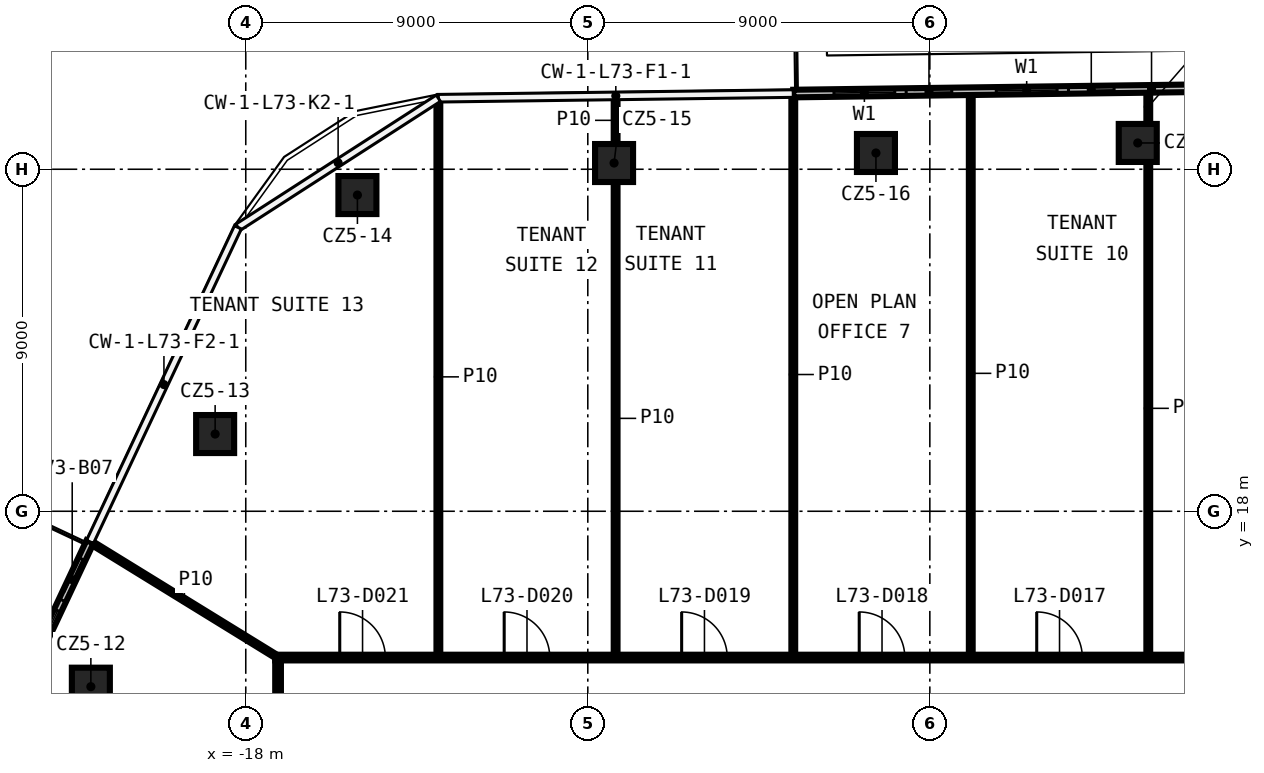
"""IFC4 building model, lengths in metres.
Left out: names, types, materials, properties, quantities, classifications, styles, units other than length and angle.
Written with IfcOpenShell. Run it as: python <this file> out.ifc"""

import sys

from ifc_helpers import new_model, si_unit, direction, frame, frame_2d, origin, origin_2d, place, context, subcontext, project, spatial, rectangle, extrude, element, fill, save


model = new_model("IFC4")
c1 = context("Model", 3, precision=1e-05, world=origin(), true_north=direction((0.0, 1.0)))
c2 = subcontext(c1, "Body", "Model", "MODEL_VIEW")
j1 = project(units=[si_unit("LENGTHUNIT", "METRE"), si_unit("PLANEANGLEUNIT", "RADIAN")], contexts=[c1])
p1 = place(None, origin())
s1 = spatial("IfcSite", under=j1, at=p1, CompositionType="ELEMENT")
p2 = place(p1, origin())
s2 = spatial("IfcBuilding", under=s1, at=p2, CompositionType="ELEMENT")
p3 = place(p2, frame((0.0, 0.0, 340.4)))
s3 = spatial("IfcBuildingStorey", under=s2, at=p3, CompositionType="ELEMENT", Elevation=340.4)
for number, where, z_axis, x_axis in (
    (1, (-22.076, 13.384, 0.0), (0.0, 0.0, 1.0), (1.0, 0.0, 0.0)),
    (2, (-18.806, 20.032, 0.0), (0.0, 0.0, 1.0), (1.0, 0.0, 0.0)),
    (3, (-15.062, 26.321, 0.0), (0.0, 0.0, 1.0), (1.0, 0.0, 0.0)),
    (4, (-8.309, 27.164, 0.0), (0.0, 0.0, 1.0), (1.0, 0.0, 0.0)),
    (5, (-1.418, 27.428, 0.0), (0.0, 0.0, 1.0), (1.0, 0.0, 0.0)),
    (6, (5.471, 27.692, 0.0), (0.0, 0.0, 1.0), (1.0, 0.0, 0.0)),
):
    element("IfcColumn", number, at=place(p3, frame(where, z_axis=z_axis, x_axis=x_axis)), inside=s3, PredefinedType="COLUMN", context=c2, shape_type="SweptSolid", body=[
        extrude(rectangle(XDim=1.0, YDim=1.0, at=origin_2d()), origin(), (0.0, 0.0, 1.0), 3.82),
    ])
p4 = place(p3, frame((-17.225, 14.15, 0.0), z_axis=(0.0, 0.0, 1.0), x_axis=(1.0, 0.0, 0.0)))
e7 = element("IfcWall", 7, at=p4, inside=s3, PredefinedType="PARTITIONING", context=c2, shape_type="SweptSolid", body=[
    extrude(rectangle(XDim=34.45, YDim=0.15, at=frame_2d((17.225, 0.0))), origin(), (0.0, 0.0, 1.0), 3.82),
])
p5 = place(p4, frame((24.708, 0.0, 0.0)))
e8 = element("IfcOpeningElement", 8, at=p5, cuts=e7, PredefinedType="OPENING", context=c2, shape_type="SweptSolid", body=[
    extrude(rectangle(XDim=1.2, YDim=2.1, at=frame_2d((0.6, 1.05))), frame((0.0, 0.085, 0.0), z_axis=(0.0, -1.0, 0.0), x_axis=(1.0, 0.0, 0.0)), (0.0, 0.0, 1.0), 0.17),
])
p6 = place(p4, frame((20.038, 0.0, 0.0)))
e9 = element("IfcOpeningElement", 9, at=p6, cuts=e7, PredefinedType="OPENING", context=c2, shape_type="SweptSolid", body=[
    extrude(rectangle(XDim=1.2, YDim=2.1, at=frame_2d((0.6, 1.05))), frame((0.0, 0.085, 0.0), z_axis=(0.0, -1.0, 0.0), x_axis=(1.0, 0.0, 0.0)), (0.0, 0.0, 1.0), 0.17),
])
p7 = place(p4, frame((15.367, 0.0, 0.0)))
e10 = element("IfcOpeningElement", 10, at=p7, cuts=e7, PredefinedType="OPENING", context=c2, shape_type="SweptSolid", body=[
    extrude(rectangle(XDim=1.2, YDim=2.1, at=frame_2d((0.6, 1.05))), frame((0.0, 0.085, 0.0), z_axis=(0.0, -1.0, 0.0), x_axis=(1.0, 0.0, 0.0)), (0.0, 0.0, 1.0), 0.17),
])
p8 = place(p4, frame((10.695, 0.0, 0.0)))
e11 = element("IfcOpeningElement", 11, at=p8, cuts=e7, PredefinedType="OPENING", context=c2, shape_type="SweptSolid", body=[
    extrude(rectangle(XDim=1.2, YDim=2.1, at=frame_2d((0.6, 1.05))), frame((0.0, 0.085, 0.0), z_axis=(0.0, -1.0, 0.0), x_axis=(1.0, 0.0, 0.0)), (0.0, 0.0, 1.0), 0.17),
])
p9 = place(p4, frame((6.025, 0.0, 0.0)))
e12 = element("IfcOpeningElement", 12, at=p9, cuts=e7, PredefinedType="OPENING", context=c2, shape_type="SweptSolid", body=[
    extrude(rectangle(XDim=1.2, YDim=2.1, at=frame_2d((0.6, 1.05))), frame((0.0, 0.085, 0.0), z_axis=(0.0, -1.0, 0.0), x_axis=(1.0, 0.0, 0.0)), (0.0, 0.0, 1.0), 0.17),
])
p10 = place(p4, frame((1.698, 0.0, 0.0)))
e13 = element("IfcOpeningElement", 13, at=p10, cuts=e7, PredefinedType="OPENING", context=c2, shape_type="SweptSolid", body=[
    extrude(rectangle(XDim=1.2, YDim=2.1, at=frame_2d((0.6, 1.05))), frame((0.0, 0.085, 0.0), z_axis=(0.0, -1.0, 0.0), x_axis=(1.0, 0.0, 0.0)), (0.0, 0.0, 1.0), 0.17),
])
p11 = place(p3, frame((5.748, 14.225, 0.0), z_axis=(0.0, 0.0, 1.0), x_axis=(0.0, 1.0, 0.0)))
e14 = element("IfcWall", 14, at=p11, inside=s3, PredefinedType="PARTITIONING", context=c2, shape_type="SweptSolid", body=[
    extrude(rectangle(XDim=12.967, YDim=0.1, at=frame_2d((6.483, 0.0))), origin(), (0.0, 0.0, 1.0), 3.82),
])
p12 = place(p3, frame((5.748, 28.192, 0.0), z_axis=(0.0, 0.0, 1.0), x_axis=(0.0, 1.0, 0.0)))
e15 = element("IfcWall", 15, at=p12, inside=s3, PredefinedType="PARTITIONING", context=c2, shape_type="SweptSolid", body=[
    extrude(rectangle(XDim=0.903, YDim=0.1, at=frame_2d((0.452, 0.0))), origin(), (0.0, 0.0, 1.0), 3.82),
])
p13 = place(p3, frame((1.077, 14.225, 0.0), z_axis=(0.0, 0.0, 1.0), x_axis=(0.0, 1.0, 0.0)))
e16 = element("IfcWall", 16, at=p13, inside=s3, PredefinedType="PARTITIONING", context=c2, shape_type="SweptSolid", body=[
    extrude(rectangle(XDim=14.808, YDim=0.1, at=frame_2d((7.404, 0.0))), origin(), (0.0, 0.0, 1.0), 3.82),
])
p14 = place(p3, frame((-3.593, 14.225, 0.0), z_axis=(0.0, 0.0, 1.0), x_axis=(0.0, 1.0, 0.0)))
e17 = element("IfcWall", 17, at=p14, inside=s3, PredefinedType="PARTITIONING", context=c2, shape_type="SweptSolid", body=[
    extrude(rectangle(XDim=14.747, YDim=0.1, at=frame_2d((7.374, 0.0))), origin(), (0.0, 0.0, 1.0), 3.82),
])
p15 = place(p3, frame((-8.268, 14.225, 0.0), z_axis=(0.0, 0.0, 1.0), x_axis=(0.0, 1.0, 0.0)))
e18 = element("IfcWall", 18, at=p15, inside=s3, PredefinedType="PARTITIONING", context=c2, shape_type="SweptSolid", body=[
    extrude(rectangle(XDim=12.439, YDim=0.1, at=frame_2d((6.219, 0.0))), origin(), (0.0, 0.0, 1.0), 3.82),
])
p16 = place(p3, frame((-8.268, 27.664, 0.0), z_axis=(0.0, 0.0, 1.0), x_axis=(0.0, 1.0, 0.0)))
e19 = element("IfcWall", 19, at=p16, inside=s3, PredefinedType="PARTITIONING", context=c2, shape_type="SweptSolid", body=[
    extrude(rectangle(XDim=1.246, YDim=0.1, at=frame_2d((0.623, 0.0))), origin(), (0.0, 0.0, 1.0), 3.82),
])
p17 = place(p3, frame((-12.932, 14.225, 0.0), z_axis=(0.0, 0.0, 1.0), x_axis=(0.0, 1.0, 0.0)))
e20 = element("IfcWall", 20, at=p17, inside=s3, PredefinedType="PARTITIONING", context=c2, shape_type="SweptSolid", body=[
    extrude(rectangle(XDim=14.624, YDim=0.1, at=frame_2d((7.312, 0.0))), origin(), (0.0, 0.0, 1.0), 3.82),
])
p18 = place(p3, frame((-17.15, -14.075, 0.0), z_axis=(0.0, 0.0, 1.0), x_axis=(0.0, 1.0, 0.0)))
e21 = element("IfcWall", 21, at=p18, inside=s3, PredefinedType="PARTITIONING", context=c2, shape_type="SweptSolid", body=[
    extrude(rectangle(XDim=28.15, YDim=0.15, at=frame_2d((14.075, 0.0))), origin(), (0.0, 0.0, 1.0), 3.82),
])
p19 = place(p18, frame((11.122, 0.0, 0.0)))
e22 = element("IfcOpeningElement", 22, at=p19, cuts=e21, PredefinedType="OPENING", context=c2, shape_type="SweptSolid", body=[
    extrude(rectangle(XDim=1.2, YDim=2.1, at=frame_2d((0.6, 1.05))), frame((0.0, 0.085, 0.0), z_axis=(0.0, -1.0, 0.0), x_axis=(1.0, 0.0, 0.0)), (0.0, 0.0, 1.0), 0.17),
])
p20 = place(p18, frame((5.555, 0.0, 0.0)))
e23 = element("IfcOpeningElement", 23, at=p20, cuts=e21, PredefinedType="OPENING", context=c2, shape_type="SweptSolid", body=[
    extrude(rectangle(XDim=1.2, YDim=2.1, at=frame_2d((0.6, 1.05))), frame((0.0, 0.085, 0.0), z_axis=(0.0, -1.0, 0.0), x_axis=(1.0, 0.0, 0.0)), (0.0, 0.0, 1.0), 0.17),
])
p21 = place(p18, frame((1.7, 0.0, 0.0)))
e24 = element("IfcOpeningElement", 24, at=p21, cuts=e21, PredefinedType="OPENING", context=c2, shape_type="SweptSolid", body=[
    extrude(rectangle(XDim=1.2, YDim=2.1, at=frame_2d((0.6, 1.05))), frame((0.0, 0.085, 0.0), z_axis=(0.0, -1.0, 0.0), x_axis=(1.0, 0.0, 0.0)), (0.0, 0.0, 1.0), 0.17),
])
p22 = place(p18, frame((24.457, 0.0, 0.0)))
e25 = element("IfcOpeningElement", 25, at=p22, cuts=e21, PredefinedType="OPENING", context=c2, shape_type="SweptSolid", body=[
    extrude(rectangle(XDim=1.2, YDim=2.1, at=frame_2d((0.6, 1.05))), frame((0.0, 0.085, 0.0), z_axis=(0.0, -1.0, 0.0), x_axis=(1.0, 0.0, 0.0)), (0.0, 0.0, 1.0), 0.17),
])
p23 = place(p18, frame((20.314, 0.0, 0.0)))
e26 = element("IfcOpeningElement", 26, at=p23, cuts=e21, PredefinedType="OPENING", context=c2, shape_type="SweptSolid", body=[
    extrude(rectangle(XDim=1.2, YDim=2.1, at=frame_2d((0.6, 1.05))), frame((0.0, 0.085, 0.0), z_axis=(0.0, -1.0, 0.0), x_axis=(1.0, 0.0, 0.0)), (0.0, 0.0, 1.0), 0.17),
])
p24 = place(p18, frame((16.172, 0.0, 0.0)))
e27 = element("IfcOpeningElement", 27, at=p24, cuts=e21, PredefinedType="OPENING", context=c2, shape_type="SweptSolid", body=[
    extrude(rectangle(XDim=1.2, YDim=2.1, at=frame_2d((0.6, 1.05))), frame((0.0, 0.085, 0.0), z_axis=(0.0, -1.0, 0.0), x_axis=(1.0, 0.0, 0.0)), (0.0, 0.0, 1.0), 0.17),
])
p25 = place(p3, frame((-22.081, 17.185, 0.0), z_axis=(0.0, 0.0, 1.0), x_axis=(0.85162357217, -0.524153881341, 0.0)))
e28 = element("IfcWall", 28, at=p25, inside=s3, PredefinedType="PARTITIONING", context=c2, shape_type="SweptSolid", body=[
    extrude(rectangle(XDim=5.791, YDim=0.1, at=frame_2d((2.895, 0.0))), origin(), (0.0, 0.0, 1.0), 3.82),
])
p26 = place(p3, frame((10.419, 29.177, 0.0), z_axis=(0.0, 0.0, 1.0), x_axis=(-0.999913262087, -0.013170736582, 0.0)))
e29 = element("IfcWall", 29, at=p26, inside=s3, PredefinedType="SOLIDWALL", context=c2, shape_type="SweptSolid", body=[
    extrude(rectangle(XDim=14.014, YDim=0.2, at=frame_2d((7.007, 0.0))), origin(), (0.0, 0.0, 1.0), 3.82),
])
p27 = place(p26, frame((2.0, 0.0, 0.6)))
e30 = element("IfcOpeningElement", 30, at=p27, cuts=e29, PredefinedType="OPENING", context=c2, shape_type="SweptSolid", body=[
    extrude(rectangle(XDim=1.6, YDim=2.4, at=frame_2d((0.8, 1.2))), frame((0.0, 0.11, 0.0), z_axis=(0.0, -1.0, 0.0), x_axis=(1.0, 0.0, 0.0)), (0.0, 0.0, 1.0), 0.22),
])
p28 = place(p26, frame((0.5, 0.0, 0.0)))
e31 = element("IfcOpeningElement", 31, at=p28, cuts=e29, PredefinedType="OPENING", context=c2, shape_type="SweptSolid", body=[
    extrude(rectangle(XDim=1.2, YDim=2.4, at=frame_2d((0.6, 1.2))), frame((0.0, 0.11, 0.0), z_axis=(0.0, -1.0, 0.0), x_axis=(1.0, 0.0, 0.0)), (0.0, 0.0, 1.0), 0.22),
])
p29 = place(p26, frame((7.071, 0.0, 0.6)))
e32 = element("IfcOpeningElement", 32, at=p29, cuts=e29, PredefinedType="OPENING", context=c2, shape_type="SweptSolid", body=[
    extrude(rectangle(XDim=1.6, YDim=2.4, at=frame_2d((0.8, 1.2))), frame((0.0, 0.11, 0.0), z_axis=(0.0, -1.0, 0.0), x_axis=(1.0, 0.0, 0.0)), (0.0, 0.0, 1.0), 0.22),
])
p30 = place(p26, frame((5.571, 0.0, 0.0)))
e33 = element("IfcOpeningElement", 33, at=p30, cuts=e29, PredefinedType="OPENING", context=c2, shape_type="SweptSolid", body=[
    extrude(rectangle(XDim=1.2, YDim=2.4, at=frame_2d((0.6, 1.2))), frame((0.0, 0.11, 0.0), z_axis=(0.0, -1.0, 0.0), x_axis=(1.0, 0.0, 0.0)), (0.0, 0.0, 1.0), 0.22),
])
p31 = place(p26, frame((11.342, 0.0, 0.6)))
e34 = element("IfcOpeningElement", 34, at=p31, cuts=e29, PredefinedType="OPENING", context=c2, shape_type="SweptSolid", body=[
    extrude(rectangle(XDim=1.6, YDim=2.4, at=frame_2d((0.8, 1.2))), frame((0.0, 0.11, 0.0), z_axis=(0.0, -1.0, 0.0), x_axis=(1.0, 0.0, 0.0)), (0.0, 0.0, 1.0), 0.22),
])
p32 = place(p26, frame((9.842, 0.0, 0.0)))
e35 = element("IfcOpeningElement", 35, at=p32, cuts=e29, PredefinedType="OPENING", context=c2, shape_type="SweptSolid", body=[
    extrude(rectangle(XDim=1.2, YDim=2.4, at=frame_2d((0.6, 1.2))), frame((0.0, 0.11, 0.0), z_axis=(0.0, -1.0, 0.0), x_axis=(1.0, 0.0, 0.0)), (0.0, 0.0, 1.0), 0.22),
])
p33 = place(p3, frame((-22.099, 17.195, 0.0), z_axis=(0.0, 0.0, 1.0), x_axis=(-0.425492631057, -0.904961889206, 0.0)))
e36 = element("IfcWall", 36, at=p33, inside=s3, PredefinedType="SOLIDWALL", context=c2, shape_type="SweptSolid", body=[
    extrude(rectangle(XDim=18.309, YDim=0.2, at=frame_2d((9.155, 0.0))), origin(), (0.0, 0.0, 1.0), 3.82),
])
p34 = place(p33, frame((2.0, 0.0, 0.6)))
e37 = element("IfcOpeningElement", 37, at=p34, cuts=e36, PredefinedType="OPENING", context=c2, shape_type="SweptSolid", body=[
    extrude(rectangle(XDim=1.6, YDim=2.4, at=frame_2d((0.8, 1.2))), frame((0.0, 0.11, 0.0), z_axis=(0.0, -1.0, 0.0), x_axis=(1.0, 0.0, 0.0)), (0.0, 0.0, 1.0), 0.22),
])
p35 = place(p33, frame((0.5, 0.0, 0.0)))
e38 = element("IfcOpeningElement", 38, at=p35, cuts=e36, PredefinedType="OPENING", context=c2, shape_type="SweptSolid", body=[
    extrude(rectangle(XDim=1.2, YDim=2.4, at=frame_2d((0.6, 1.2))), frame((0.0, 0.11, 0.0), z_axis=(0.0, -1.0, 0.0), x_axis=(1.0, 0.0, 0.0)), (0.0, 0.0, 1.0), 0.22),
])
p36 = place(p33, frame((6.577, 0.0, 0.6)))
e39 = element("IfcOpeningElement", 39, at=p36, cuts=e36, PredefinedType="OPENING", context=c2, shape_type="SweptSolid", body=[
    extrude(rectangle(XDim=1.6, YDim=2.4, at=frame_2d((0.8, 1.2))), frame((0.0, 0.11, 0.0), z_axis=(0.0, -1.0, 0.0), x_axis=(1.0, 0.0, 0.0)), (0.0, 0.0, 1.0), 0.22),
])
p37 = place(p33, frame((5.077, 0.0, 0.0)))
e40 = element("IfcOpeningElement", 40, at=p37, cuts=e36, PredefinedType="OPENING", context=c2, shape_type="SweptSolid", body=[
    extrude(rectangle(XDim=1.2, YDim=2.4, at=frame_2d((0.6, 1.2))), frame((0.0, 0.11, 0.0), z_axis=(0.0, -1.0, 0.0), x_axis=(1.0, 0.0, 0.0)), (0.0, 0.0, 1.0), 0.22),
])
p38 = place(p33, frame((9.655, 0.0, 0.6)))
e41 = element("IfcOpeningElement", 41, at=p38, cuts=e36, PredefinedType="OPENING", context=c2, shape_type="SweptSolid", body=[
    extrude(rectangle(XDim=1.6, YDim=2.4, at=frame_2d((0.8, 1.2))), frame((0.0, 0.11, 0.0), z_axis=(0.0, -1.0, 0.0), x_axis=(1.0, 0.0, 0.0)), (0.0, 0.0, 1.0), 0.22),
])
p39 = place(p33, frame((11.655, 0.0, 0.0)))
e42 = element("IfcOpeningElement", 42, at=p39, cuts=e36, PredefinedType="OPENING", context=c2, shape_type="SweptSolid", body=[
    extrude(rectangle(XDim=1.2, YDim=2.4, at=frame_2d((0.6, 1.2))), frame((0.0, 0.11, 0.0), z_axis=(0.0, -1.0, 0.0), x_axis=(1.0, 0.0, 0.0)), (0.0, 0.0, 1.0), 0.22),
])
p40 = place(p33, frame((15.732, 0.0, 0.6)))
e43 = element("IfcOpeningElement", 43, at=p40, cuts=e36, PredefinedType="OPENING", context=c2, shape_type="SweptSolid", body=[
    extrude(rectangle(XDim=1.6, YDim=2.4, at=frame_2d((0.8, 1.2))), frame((0.0, 0.11, 0.0), z_axis=(0.0, -1.0, 0.0), x_axis=(1.0, 0.0, 0.0)), (0.0, 0.0, 1.0), 0.22),
])
p41 = place(p33, frame((14.232, 0.0, 0.0)))
e44 = element("IfcOpeningElement", 44, at=p41, cuts=e36, PredefinedType="OPENING", context=c2, shape_type="SweptSolid", body=[
    extrude(rectangle(XDim=1.2, YDim=2.4, at=frame_2d((0.6, 1.2))), frame((0.0, 0.11, 0.0), z_axis=(0.0, -1.0, 0.0), x_axis=(1.0, 0.0, 0.0)), (0.0, 0.0, 1.0), 0.22),
])
p42 = place(p6, origin())
e45 = element("IfcDoor", 45, at=p42, inside=s3, OperationType="SINGLE_SWING_RIGHT", PredefinedType="DOOR", context=c2, shape_type="SweptSolid", body=[
    extrude(rectangle(XDim=1.2, YDim=2.1, at=frame_2d((0.6, 1.05))), frame((0.0, 0.025, 0.0), z_axis=(0.0, -1.0, 0.0), x_axis=(1.0, 0.0, 0.0)), (0.0, 0.0, 1.0), 0.05),
])
fill(e9, e45)
p43 = place(p7, origin())
e46 = element("IfcDoor", 46, at=p43, inside=s3, OperationType="SINGLE_SWING_LEFT", PredefinedType="DOOR", context=c2, shape_type="SweptSolid", body=[
    extrude(rectangle(XDim=1.2, YDim=2.1, at=frame_2d((0.6, 1.05))), frame((0.0, 0.025, 0.0), z_axis=(0.0, -1.0, 0.0), x_axis=(1.0, 0.0, 0.0)), (0.0, 0.0, 1.0), 0.05),
])
fill(e10, e46)
p44 = place(p8, origin())
e47 = element("IfcDoor", 47, at=p44, inside=s3, OperationType="SINGLE_SWING_RIGHT", PredefinedType="DOOR", context=c2, shape_type="SweptSolid", body=[
    extrude(rectangle(XDim=1.2, YDim=2.1, at=frame_2d((0.6, 1.05))), frame((0.0, 0.025, 0.0), z_axis=(0.0, -1.0, 0.0), x_axis=(1.0, 0.0, 0.0)), (0.0, 0.0, 1.0), 0.05),
])
fill(e11, e47)
p45 = place(p9, origin())
e48 = element("IfcDoor", 48, at=p45, inside=s3, OperationType="SINGLE_SWING_LEFT", PredefinedType="DOOR", context=c2, shape_type="SweptSolid", body=[
    extrude(rectangle(XDim=1.2, YDim=2.1, at=frame_2d((0.6, 1.05))), frame((0.0, 0.025, 0.0), z_axis=(0.0, -1.0, 0.0), x_axis=(1.0, 0.0, 0.0)), (0.0, 0.0, 1.0), 0.05),
])
fill(e12, e48)
p46 = place(p10, origin())
e49 = element("IfcDoor", 49, at=p46, inside=s3, OperationType="SINGLE_SWING_RIGHT", PredefinedType="DOOR", context=c2, shape_type="SweptSolid", body=[
    extrude(rectangle(XDim=1.2, YDim=2.1, at=frame_2d((0.6, 1.05))), frame((0.0, 0.025, 0.0), z_axis=(0.0, -1.0, 0.0), x_axis=(1.0, 0.0, 0.0)), (0.0, 0.0, 1.0), 0.05),
])
fill(e13, e49)
p47 = place(p29, origin())
e50 = element("IfcWindow", 50, at=p47, inside=s3, PartitioningType="SINGLE_PANEL", PredefinedType="WINDOW", context=c2, shape_type="SweptSolid", body=[
    extrude(rectangle(XDim=1.6, YDim=2.4, at=frame_2d((0.8, 1.2))), frame((0.0, 0.03, 0.0), z_axis=(0.0, -1.0, 0.0), x_axis=(1.0, 0.0, 0.0)), (0.0, 0.0, 1.0), 0.06),
])
fill(e32, e50)
p48 = place(p30, origin())
e51 = element("IfcDoor", 51, at=p48, inside=s3, OperationType="SLIDING_TO_LEFT", PredefinedType="DOOR", context=c2, shape_type="SweptSolid", body=[
    extrude(rectangle(XDim=1.2, YDim=2.4, at=frame_2d((0.6, 1.2))), frame((0.0, 0.025, 0.0), z_axis=(0.0, -1.0, 0.0), x_axis=(1.0, 0.0, 0.0)), (0.0, 0.0, 1.0), 0.05),
])
fill(e33, e51)
p49 = place(p31, origin())
e52 = element("IfcWindow", 52, at=p49, inside=s3, PartitioningType="SINGLE_PANEL", PredefinedType="WINDOW", context=c2, shape_type="SweptSolid", body=[
    extrude(rectangle(XDim=1.6, YDim=2.4, at=frame_2d((0.8, 1.2))), frame((0.0, 0.03, 0.0), z_axis=(0.0, -1.0, 0.0), x_axis=(1.0, 0.0, 0.0)), (0.0, 0.0, 1.0), 0.06),
])
fill(e34, e52)
p50 = place(p32, origin())
e53 = element("IfcDoor", 53, at=p50, inside=s3, OperationType="SLIDING_TO_LEFT", PredefinedType="DOOR", context=c2, shape_type="SweptSolid", body=[
    extrude(rectangle(XDim=1.2, YDim=2.4, at=frame_2d((0.6, 1.2))), frame((0.0, 0.025, 0.0), z_axis=(0.0, -1.0, 0.0), x_axis=(1.0, 0.0, 0.0)), (0.0, 0.0, 1.0), 0.05),
])
fill(e35, e53)
p51 = place(p34, origin())
e54 = element("IfcWindow", 54, at=p51, inside=s3, PartitioningType="SINGLE_PANEL", PredefinedType="WINDOW", context=c2, shape_type="SweptSolid", body=[
    extrude(rectangle(XDim=1.6, YDim=2.4, at=frame_2d((0.8, 1.2))), frame((0.0, 0.03, 0.0), z_axis=(0.0, -1.0, 0.0), x_axis=(1.0, 0.0, 0.0)), (0.0, 0.0, 1.0), 0.06),
])
fill(e37, e54)
p52 = place(p35, origin())
e55 = element("IfcDoor", 55, at=p52, inside=s3, OperationType="SLIDING_TO_LEFT", PredefinedType="DOOR", context=c2, shape_type="SweptSolid", body=[
    extrude(rectangle(XDim=1.2, YDim=2.4, at=frame_2d((0.6, 1.2))), frame((0.0, 0.025, 0.0), z_axis=(0.0, -1.0, 0.0), x_axis=(1.0, 0.0, 0.0)), (0.0, 0.0, 1.0), 0.05),
])
fill(e38, e55)
save(model, sys.argv[1])
